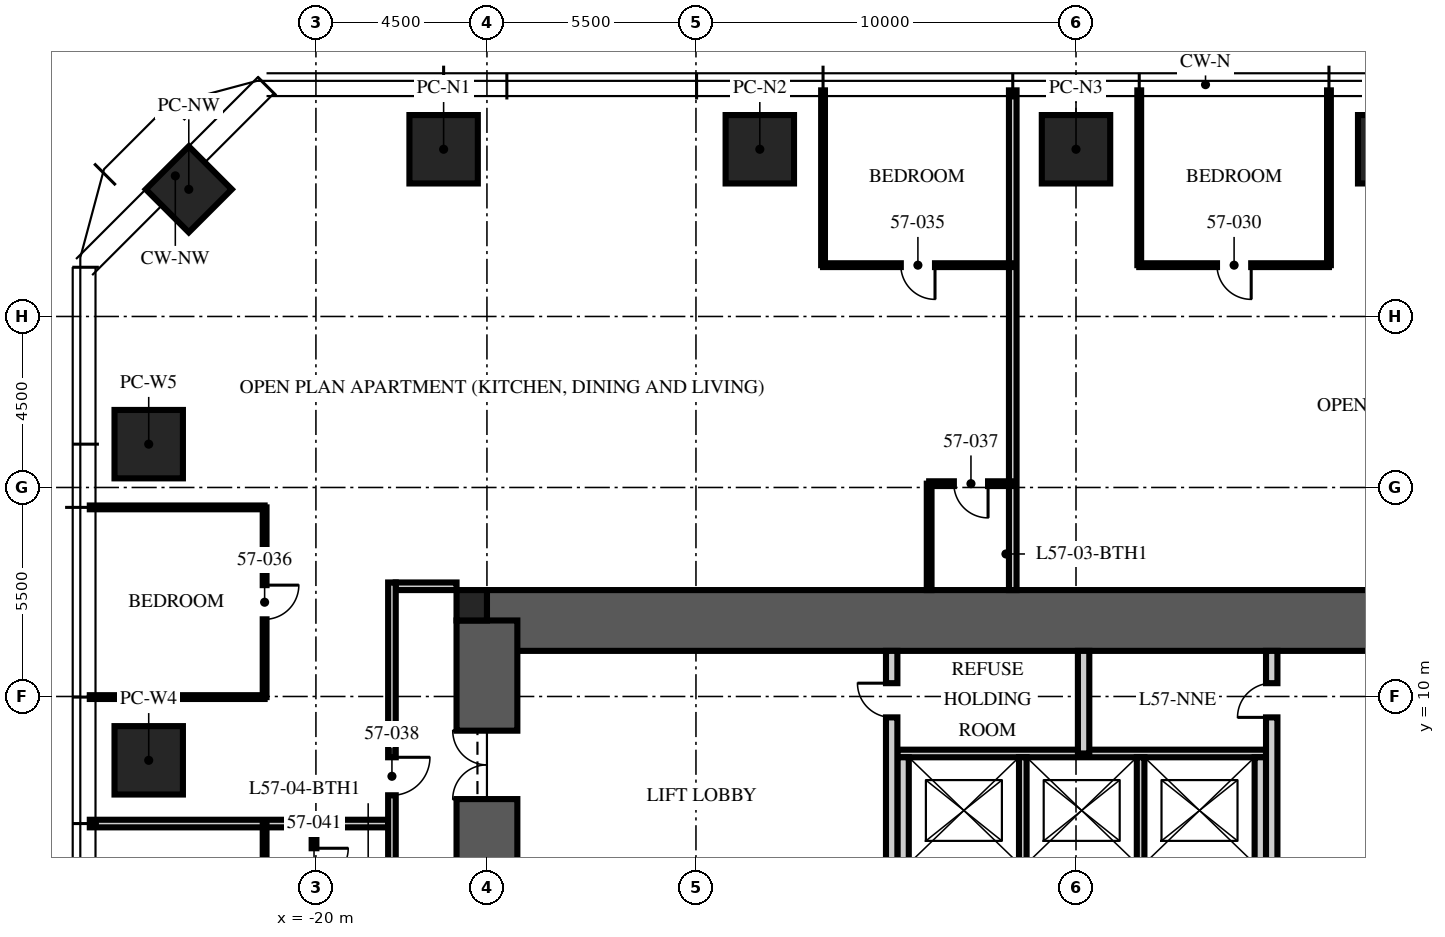
"""IFC4 building model, lengths in metres.
Left out: names, types, materials, properties, quantities, classifications, styles, units other than length and angle.
Written with IfcOpenShell. Run it as: python <this file> out.ifc"""

import sys

from ifc_helpers import new_model, si_unit, direction, frame, frame_2d, origin, origin_2d, place, context, subcontext, project, spatial, rectangle, extrude, element, fill, save


model = new_model("IFC4")
c1 = context("Model", 3, precision=1e-05, world=origin(), true_north=direction((0.0, 1.0)))
c2 = subcontext(c1, "Body", "Model", "MODEL_VIEW")
j1 = project(units=[si_unit("LENGTHUNIT", "METRE"), si_unit("PLANEANGLEUNIT", "RADIAN")], contexts=[c1])
p1 = place(None, origin())
s1 = spatial("IfcSite", under=j1, at=p1, CompositionType="ELEMENT")
p2 = place(p1, origin())
s2 = spatial("IfcBuilding", under=s1, at=p2, CompositionType="ELEMENT")
p3 = place(p2, frame((0.0, 0.0, 229.5)))
s3 = spatial("IfcBuildingStorey", under=s2, at=p3, CompositionType="ELEMENT", Elevation=229.5)
p4 = place(p3, frame((-15.5, 12.0, -0.25), z_axis=(0.0, 0.0, 1.0), x_axis=(1.0, 0.0, 0.0)))
e1 = element("IfcWall", 1, at=p4, inside=s3, PredefinedType="SHEAR", context=c2, shape_type="SweptSolid", body=[
    extrude(rectangle(XDim=31.0, YDim=1.6, at=frame_2d((15.5, 0.0))), origin(), (0.0, 0.0, 1.0), 3.75),
])
p5 = place(p3, frame((-15.5, -12.0, -0.25), z_axis=(0.0, 0.0, 1.0), x_axis=(0.0, 1.0, 0.0)))
e2 = element("IfcWall", 2, at=p5, inside=s3, PredefinedType="SHEAR", context=c2, shape_type="SweptSolid", body=[
    extrude(rectangle(XDim=24.0, YDim=1.6, at=frame_2d((12.0, 0.0))), origin(), (0.0, 0.0, 1.0), 3.75),
])
p6 = place(p5, frame((3.2, 0.0, 0.25)))
e3 = element("IfcOpeningElement", 3, at=p6, cuts=e2, PredefinedType="OPENING", context=c2, shape_type="SweptSolid", body=[
    extrude(rectangle(XDim=1.2, YDim=2.1, at=frame_2d((0.6, 1.05))), frame((0.0, 0.81, 0.0), z_axis=(0.0, -1.0, 0.0), x_axis=(1.0, 0.0, 0.0)), (0.0, 0.0, 1.0), 1.62),
])
p7 = place(p5, frame((19.3, 0.0, 0.25)))
e4 = element("IfcOpeningElement", 4, at=p7, cuts=e2, PredefinedType="OPENING", context=c2, shape_type="SweptSolid", body=[
    extrude(rectangle(XDim=1.8, YDim=2.1, at=frame_2d((0.9, 1.05))), frame((0.0, 0.81, 0.0), z_axis=(0.0, -1.0, 0.0), x_axis=(1.0, 0.0, 0.0)), (0.0, 0.0, 1.0), 1.62),
])
p8 = place(p3, frame((-15.9, 12.4, -0.25), z_axis=(0.0, 0.0, 1.0), x_axis=(1.0, 0.0, 0.0)))
e5 = element("IfcColumn", 5, at=p8, inside=s3, PredefinedType="COLUMN", context=c2, shape_type="SweptSolid", body=[
    extrude(rectangle(XDim=0.8, YDim=0.8, at=origin_2d()), origin(), (0.0, 0.0, 1.0), 3.75),
])
for number, where, z_axis, x_axis in (
    (6, (-16.64, 24.4, 0.0), (0.0, 0.0, 1.0), (1.0, 0.0, 0.0)),
    (7, (-8.32, 24.4, 0.0), (0.0, 0.0, 1.0), (1.0, 0.0, 0.0)),
    (8, (0.0, 24.4, 0.0), (0.0, 0.0, 1.0), (1.0, 0.0, 0.0)),
    (9, (8.32, 24.4, 0.0), (0.0, 0.0, 1.0), (1.0, 0.0, 0.0)),
    (10, (-24.4, 8.32, 0.0), (0.0, 0.0, 1.0), (0.0, 1.0, 0.0)),
    (11, (-24.4, 16.64, 0.0), (0.0, 0.0, 1.0), (0.0, 1.0, 0.0)),
):
    element("IfcColumn", number, at=place(p3, frame(where, z_axis=z_axis, x_axis=x_axis)), inside=s3, PredefinedType="COLUMN", context=c2, shape_type="SweptSolid", body=[
        extrude(rectangle(XDim=1.8, YDim=1.8, at=origin_2d()), origin(), (0.0, 0.0, 1.0), 3.75),
    ])
p9 = place(p3, frame((-23.346, 23.346, 0.0), z_axis=(0.0, 0.0, 1.0), x_axis=(0.707106781187, 0.707106781187, 0.0)))
e12 = element("IfcColumn", 12, at=p9, inside=s3, PredefinedType="COLUMN", context=c2, shape_type="SweptSolid", body=[
    extrude(rectangle(XDim=1.6, YDim=1.6, at=origin_2d()), origin(), (0.0, 0.0, 1.0), 3.75),
])
p10 = place(p3, frame((-4.7, 8.5, 0.0), z_axis=(0.0, 0.0, 1.0), x_axis=(1.0, 0.0, 0.0)))
e13 = element("IfcWall", 13, at=p10, inside=s3, PredefinedType="PARTITIONING", context=c2, shape_type="SweptSolid", body=[
    extrude(rectangle(XDim=9.7, YDim=0.2, at=frame_2d((4.85, 0.0))), origin(), (0.0, 0.0, 1.0), 3.5),
])
for number, where, z_axis, x_axis in (
    (14, (-4.55, 5.6, 0.0), (0.0, 0.0, 1.0), (0.0, 1.0, 0.0)),
    (15, (4.85, 5.6, 0.0), (0.0, 0.0, 1.0), (0.0, 1.0, 0.0)),
):
    element("IfcWall", number, at=place(p3, frame(where, z_axis=z_axis, x_axis=x_axis)), inside=s3, PredefinedType="PARTITIONING", context=c2, shape_type="SweptSolid", body=[
        extrude(rectangle(XDim=2.8, YDim=0.3, at=frame_2d((1.4, 0.0))), origin(), (0.0, 0.0, 1.0), 3.5),
    ])
for number, where, z_axis, x_axis in (
    (16, (-1.4, 5.6, 0.0), (0.0, 0.0, 1.0), (0.0, 1.0, 0.0)),
    (17, (1.7, 5.6, 0.0), (0.0, 0.0, 1.0), (0.0, 1.0, 0.0)),
):
    element("IfcWall", number, at=place(p3, frame(where, z_axis=z_axis, x_axis=x_axis)), inside=s3, PredefinedType="PARTITIONING", context=c2, shape_type="SweptSolid", body=[
        extrude(rectangle(XDim=2.8, YDim=0.2, at=frame_2d((1.4, 0.0))), origin(), (0.0, 0.0, 1.0), 3.5),
    ])
p11 = place(p3, frame((-4.85, 5.3, 0.0), z_axis=(0.0, 0.0, 1.0), x_axis=(0.0, 1.0, 0.0)))
e18 = element("IfcWall", 18, at=p11, inside=s3, PredefinedType="PARTITIONING", context=c2, shape_type="SweptSolid", body=[
    extrude(rectangle(XDim=5.9, YDim=0.3, at=frame_2d((2.95, 0.0))), origin(), (0.0, 0.0, 1.0), 3.5),
])
p12 = place(p11, frame((4.15, 0.0, 0.0)))
e19 = element("IfcOpeningElement", 19, at=p12, cuts=e18, PredefinedType="OPENING", context=c2, shape_type="SweptSolid", body=[
    extrude(rectangle(XDim=0.9, YDim=2.1, at=frame_2d((0.45, 1.05))), frame((0.0, 0.16, 0.0), z_axis=(0.0, -1.0, 0.0), x_axis=(1.0, 0.0, 0.0)), (0.0, 0.0, 1.0), 0.32),
])
p13 = place(p3, frame((5.15, 5.3, 0.0), z_axis=(0.0, 0.0, 1.0), x_axis=(0.0, 1.0, 0.0)))
e20 = element("IfcWall", 20, at=p13, inside=s3, PredefinedType="PARTITIONING", context=c2, shape_type="SweptSolid", body=[
    extrude(rectangle(XDim=5.9, YDim=0.3, at=frame_2d((2.95, 0.0))), origin(), (0.0, 0.0, 1.0), 3.5),
])
p14 = place(p13, frame((4.15, 0.0, 0.0)))
e21 = element("IfcOpeningElement", 21, at=p14, cuts=e20, PredefinedType="OPENING", context=c2, shape_type="SweptSolid", body=[
    extrude(rectangle(XDim=0.9, YDim=2.1, at=frame_2d((0.45, 1.05))), frame((0.0, 0.16, 0.0), z_axis=(0.0, -1.0, 0.0), x_axis=(1.0, 0.0, 0.0)), (0.0, 0.0, 1.0), 0.32),
])
p15 = place(p3, frame((0.2, 8.5, 0.0), z_axis=(0.0, 0.0, 1.0), x_axis=(0.0, 1.0, 0.0)))
e22 = element("IfcWall", 22, at=p15, inside=s3, PredefinedType="PARTITIONING", context=c2, shape_type="SweptSolid", body=[
    extrude(rectangle(XDim=2.7, YDim=0.3, at=frame_2d((1.35, 0.0))), origin(), (0.0, 0.0, 1.0), 3.5),
])
p16 = place(p3, frame((-16.3, 12.9, 0.0), z_axis=(0.0, 0.0, 1.0), x_axis=(-1.0, 0.0, 0.0)))
e23 = element("IfcWall", 23, at=p16, inside=s3, PredefinedType="PARTITIONING", context=c2, shape_type="SweptSolid", body=[
    extrude(rectangle(XDim=1.6, YDim=0.2, at=frame_2d((0.8, 0.0))), origin(), (0.0, 0.0, 1.0), 2.3),
])
for number, where, z_axis, x_axis in (
    (24, (6.656, 21.35, 0.0), (0.0, 0.0, 1.0), (0.0, 1.0, 0.0)),
    (25, (1.664, 21.35, 0.0), (0.0, 0.0, 1.0), (0.0, 1.0, 0.0)),
):
    element("IfcWall", number, at=place(p3, frame(where, z_axis=z_axis, x_axis=x_axis)), inside=s3, PredefinedType="PARTITIONING", context=c2, shape_type="SweptSolid", body=[
        extrude(rectangle(XDim=4.6, YDim=0.1, at=frame_2d((2.3, 0.0))), origin(), (0.0, 0.0, 1.0), 2.91),
    ])
p17 = place(p3, frame((-1.664, 12.8, 0.0), z_axis=(0.0, 0.0, 1.0), x_axis=(0.0, 1.0, 0.0)))
e26 = element("IfcWall", 26, at=p17, inside=s3, PredefinedType="PARTITIONING", context=c2, shape_type="SweptSolid", body=[
    extrude(rectangle(XDim=13.15, YDim=0.2, at=frame_2d((6.575, 0.0))), origin(), (0.0, 0.0, 1.0), 2.91),
])
for number, where, z_axis, x_axis in (
    (27, (-6.656, 21.35, 0.0), (0.0, 0.0, 1.0), (0.0, 1.0, 0.0)),
    (28, (-21.35, 14.976, 0.0), (0.0, 0.0, 1.0), (-1.0, 0.0, 0.0)),
    (29, (-21.35, 9.984, 0.0), (0.0, 0.0, 1.0), (-1.0, 0.0, 0.0)),
):
    element("IfcWall", number, at=place(p3, frame(where, z_axis=z_axis, x_axis=x_axis)), inside=s3, PredefinedType="PARTITIONING", context=c2, shape_type="SweptSolid", body=[
        extrude(rectangle(XDim=4.6, YDim=0.1, at=frame_2d((2.3, 0.0))), origin(), (0.0, 0.0, 1.0), 2.91),
    ])
p18 = place(p3, frame((-18.1, 6.656, 0.0), z_axis=(0.0, 0.0, 1.0), x_axis=(-1.0, 0.0, 0.0)))
e30 = element("IfcWall", 30, at=p18, inside=s3, PredefinedType="PARTITIONING", context=c2, shape_type="SweptSolid", body=[
    extrude(rectangle(XDim=7.85, YDim=0.2, at=frame_2d((3.925, 0.0))), origin(), (0.0, 0.0, 1.0), 2.91),
])
p19 = place(p3, frame((6.656, 21.35, 0.0), z_axis=(0.0, 0.0, 1.0), x_axis=(-1.0, 0.0, 0.0)))
e31 = element("IfcWall", 31, at=p19, inside=s3, PredefinedType="PARTITIONING", context=c2, shape_type="SweptSolid", body=[
    extrude(rectangle(XDim=4.992, YDim=0.1, at=frame_2d((2.496, 0.0))), origin(), (0.0, 0.0, 1.0), 2.81),
])
p20 = place(p19, frame((2.046, 0.0, 0.0)))
e32 = element("IfcOpeningElement", 32, at=p20, cuts=e31, PredefinedType="OPENING", context=c2, shape_type="SweptSolid", body=[
    extrude(rectangle(XDim=0.9, YDim=2.1, at=frame_2d((0.45, 1.05))), frame((0.0, 0.06, 0.0), z_axis=(0.0, -1.0, 0.0), x_axis=(1.0, 0.0, 0.0)), (0.0, 0.0, 1.0), 0.12),
])
p21 = place(p3, frame((-1.664, 21.35, 0.0), z_axis=(0.0, 0.0, 1.0), x_axis=(-1.0, 0.0, 0.0)))
e33 = element("IfcWall", 33, at=p21, inside=s3, PredefinedType="PARTITIONING", context=c2, shape_type="SweptSolid", body=[
    extrude(rectangle(XDim=4.992, YDim=0.1, at=frame_2d((2.496, 0.0))), origin(), (0.0, 0.0, 1.0), 2.81),
])
p22 = place(p21, frame((2.046, 0.0, 0.0)))
e34 = element("IfcOpeningElement", 34, at=p22, cuts=e33, PredefinedType="OPENING", context=c2, shape_type="SweptSolid", body=[
    extrude(rectangle(XDim=0.9, YDim=2.1, at=frame_2d((0.45, 1.05))), frame((0.0, 0.06, 0.0), z_axis=(0.0, -1.0, 0.0), x_axis=(1.0, 0.0, 0.0)), (0.0, 0.0, 1.0), 0.12),
])
p23 = place(p3, frame((-21.35, 14.976, 0.0), z_axis=(0.0, 0.0, 1.0), x_axis=(0.0, -1.0, 0.0)))
e35 = element("IfcWall", 35, at=p23, inside=s3, PredefinedType="PARTITIONING", context=c2, shape_type="SweptSolid", body=[
    extrude(rectangle(XDim=4.992, YDim=0.1, at=frame_2d((2.496, 0.0))), origin(), (0.0, 0.0, 1.0), 2.81),
])
p24 = place(p23, frame((2.046, 0.0, 0.0)))
e36 = element("IfcOpeningElement", 36, at=p24, cuts=e35, PredefinedType="OPENING", context=c2, shape_type="SweptSolid", body=[
    extrude(rectangle(XDim=0.9, YDim=2.1, at=frame_2d((0.45, 1.05))), frame((0.0, 0.06, 0.0), z_axis=(0.0, -1.0, 0.0), x_axis=(1.0, 0.0, 0.0)), (0.0, 0.0, 1.0), 0.12),
])
p25 = place(p3, frame((-1.664, 15.6, 0.0), z_axis=(0.0, 0.0, 1.0), x_axis=(-1.0, 0.0, 0.0)))
e37 = element("IfcWall", 37, at=p25, inside=s3, PredefinedType="PARTITIONING", context=c2, shape_type="SweptSolid", body=[
    extrude(rectangle(XDim=2.2, YDim=0.125, at=frame_2d((1.1, 0.0))), origin(), (0.0, 0.0, 1.0), 3.5),
])
p26 = place(p25, frame((0.65, 0.0, 0.0)))
e38 = element("IfcOpeningElement", 38, at=p26, cuts=e37, PredefinedType="OPENING", context=c2, shape_type="SweptSolid", body=[
    extrude(rectangle(XDim=0.9, YDim=2.1, at=frame_2d((0.45, 1.05))), frame((0.0, 0.073, 0.0), z_axis=(0.0, -1.0, 0.0), x_axis=(1.0, 0.0, 0.0)), (0.0, 0.0, 1.0), 0.145),
])
p27 = place(p3, frame((-3.864, 12.8, 0.0), z_axis=(0.0, 0.0, 1.0), x_axis=(0.0, 1.0, 0.0)))
e39 = element("IfcWall", 39, at=p27, inside=s3, PredefinedType="PARTITIONING", context=c2, shape_type="SweptSolid", body=[
    extrude(rectangle(XDim=2.8, YDim=0.125, at=frame_2d((1.4, 0.0))), origin(), (0.0, 0.0, 1.0), 3.5),
])
p28 = place(p3, frame((-21.35, 6.656, 0.0), z_axis=(0.0, 0.0, 1.0), x_axis=(0.0, -1.0, 0.0)))
e40 = element("IfcWall", 40, at=p28, inside=s3, PredefinedType="PARTITIONING", context=c2, shape_type="SweptSolid", body=[
    extrude(rectangle(XDim=4.992, YDim=0.1, at=frame_2d((2.496, 0.0))), origin(), (0.0, 0.0, 1.0), 2.81),
])
p29 = place(p28, frame((2.046, 0.0, 0.0)))
e41 = element("IfcOpeningElement", 41, at=p29, cuts=e40, PredefinedType="OPENING", context=c2, shape_type="SweptSolid", body=[
    extrude(rectangle(XDim=0.9, YDim=2.1, at=frame_2d((0.45, 1.05))), frame((0.0, 0.06, 0.0), z_axis=(0.0, -1.0, 0.0), x_axis=(1.0, 0.0, 0.0)), (0.0, 0.0, 1.0), 0.12),
])
p30 = place(p3, frame((-20.05, 6.656, 0.0), z_axis=(0.0, 0.0, 1.0), x_axis=(0.0, -1.0, 0.0)))
e42 = element("IfcWall", 42, at=p30, inside=s3, PredefinedType="PARTITIONING", context=c2, shape_type="SweptSolid", body=[
    extrude(rectangle(XDim=2.2, YDim=0.125, at=frame_2d((1.1, 0.0))), origin(), (0.0, 0.0, 1.0), 3.5),
])
p31 = place(p30, frame((0.65, 0.0, 0.0)))
e43 = element("IfcOpeningElement", 43, at=p31, cuts=e42, PredefinedType="OPENING", context=c2, shape_type="SweptSolid", body=[
    extrude(rectangle(XDim=0.9, YDim=2.1, at=frame_2d((0.45, 1.05))), frame((0.0, 0.073, 0.0), z_axis=(0.0, -1.0, 0.0), x_axis=(1.0, 0.0, 0.0)), (0.0, 0.0, 1.0), 0.145),
])
p32 = place(p3, frame((-18.0, 13.0, 0.0), z_axis=(0.0, 0.0, 1.0), x_axis=(0.0, -1.0, 0.0)))
e44 = element("IfcWall", 44, at=p32, inside=s3, PredefinedType="PARTITIONING", context=c2, shape_type="SweptSolid", body=[
    extrude(rectangle(XDim=25.8, YDim=0.2, at=frame_2d((12.9, 0.0))), origin(), (0.0, 0.0, 1.0), 2.6),
])
p33 = place(p32, frame((4.6, 0.0, 0.0)))
e45 = element("IfcOpeningElement", 45, at=p33, cuts=e44, PredefinedType="OPENING", context=c2, shape_type="SweptSolid", body=[
    extrude(rectangle(XDim=1.0, YDim=2.2, at=frame_2d((0.5, 1.1))), frame((0.0, 0.11, 0.0), z_axis=(0.0, -1.0, 0.0), x_axis=(1.0, 0.0, 0.0)), (0.0, 0.0, 1.0), 0.22),
])
p34 = place(p32, frame((21.364, 0.0, 0.0)))
e46 = element("IfcOpeningElement", 46, at=p34, cuts=e44, PredefinedType="OPENING", context=c2, shape_type="SweptSolid", body=[
    extrude(rectangle(XDim=1.0, YDim=2.2, at=frame_2d((0.5, 1.1))), frame((0.0, 0.11, 0.0), z_axis=(0.0, -1.0, 0.0), x_axis=(1.0, 0.0, 0.0)), (0.0, 0.0, 1.0), 0.22),
])
p35 = place(p32, frame((23.754, 0.0, 0.0)))
e47 = element("IfcOpeningElement", 47, at=p35, cuts=e44, PredefinedType="OPENING", context=c2, shape_type="SweptSolid", body=[
    extrude(rectangle(XDim=1.0, YDim=2.2, at=frame_2d((0.5, 1.1))), frame((0.0, 0.11, 0.0), z_axis=(0.0, -1.0, 0.0), x_axis=(1.0, 0.0, 0.0)), (0.0, 0.0, 1.0), 0.22),
])
p36 = place(p7, origin())
e48 = element("IfcDoor", 48, at=p36, inside=s3, OperationType="DOUBLE_DOOR_SINGLE_SWING", PredefinedType="DOOR", context=c2, shape_type="SweptSolid", body=[
    extrude(rectangle(XDim=1.8, YDim=2.1, at=frame_2d((0.9, 1.05))), frame((0.0, 0.025, 0.0), z_axis=(0.0, -1.0, 0.0), x_axis=(1.0, 0.0, 0.0)), (0.0, 0.0, 1.0), 0.05),
])
fill(e4, e48)
p37 = place(p12, origin())
e49 = element("IfcDoor", 49, at=p37, inside=s3, OperationType="SINGLE_SWING_RIGHT", PredefinedType="DOOR", context=c2, shape_type="SweptSolid", body=[
    extrude(rectangle(XDim=0.9, YDim=2.1, at=frame_2d((0.45, 1.05))), frame((0.0, 0.025, 0.0), z_axis=(0.0, -1.0, 0.0), x_axis=(1.0, 0.0, 0.0)), (0.0, 0.0, 1.0), 0.05),
])
fill(e19, e49)
p38 = place(p14, origin())
e50 = element("IfcDoor", 50, at=p38, inside=s3, OperationType="SINGLE_SWING_LEFT", PredefinedType="DOOR", context=c2, shape_type="SweptSolid", body=[
    extrude(rectangle(XDim=0.9, YDim=2.1, at=frame_2d((0.45, 1.05))), frame((0.0, 0.025, 0.0), z_axis=(0.0, -1.0, 0.0), x_axis=(1.0, 0.0, 0.0)), (0.0, 0.0, 1.0), 0.05),
])
fill(e21, e50)
p39 = place(p20, origin())
e51 = element("IfcDoor", 51, at=p39, inside=s3, OperationType="SINGLE_SWING_LEFT", PredefinedType="DOOR", context=c2, shape_type="SweptSolid", body=[
    extrude(rectangle(XDim=0.9, YDim=2.1, at=frame_2d((0.45, 1.05))), frame((0.0, 0.025, 0.0), z_axis=(0.0, -1.0, 0.0), x_axis=(1.0, 0.0, 0.0)), (0.0, 0.0, 1.0), 0.05),
])
fill(e32, e51)
p40 = place(p22, origin())
e52 = element("IfcDoor", 52, at=p40, inside=s3, OperationType="SINGLE_SWING_LEFT", PredefinedType="DOOR", context=c2, shape_type="SweptSolid", body=[
    extrude(rectangle(XDim=0.9, YDim=2.1, at=frame_2d((0.45, 1.05))), frame((0.0, 0.025, 0.0), z_axis=(0.0, -1.0, 0.0), x_axis=(1.0, 0.0, 0.0)), (0.0, 0.0, 1.0), 0.05),
])
fill(e34, e52)
p41 = place(p24, origin())
e53 = element("IfcDoor", 53, at=p41, inside=s3, OperationType="SINGLE_SWING_LEFT", PredefinedType="DOOR", context=c2, shape_type="SweptSolid", body=[
    extrude(rectangle(XDim=0.9, YDim=2.1, at=frame_2d((0.45, 1.05))), frame((0.0, 0.025, 0.0), z_axis=(0.0, -1.0, 0.0), x_axis=(1.0, 0.0, 0.0)), (0.0, 0.0, 1.0), 0.05),
])
fill(e36, e53)
p42 = place(p26, origin())
e54 = element("IfcDoor", 54, at=p42, inside=s3, OperationType="SINGLE_SWING_LEFT", PredefinedType="DOOR", context=c2, shape_type="SweptSolid", body=[
    extrude(rectangle(XDim=0.9, YDim=2.1, at=frame_2d((0.45, 1.05))), frame((0.0, 0.025, 0.0), z_axis=(0.0, -1.0, 0.0), x_axis=(1.0, 0.0, 0.0)), (0.0, 0.0, 1.0), 0.05),
])
fill(e38, e54)
p43 = place(p33, origin())
e55 = element("IfcDoor", 55, at=p43, inside=s3, OperationType="SINGLE_SWING_LEFT", PredefinedType="DOOR", context=c2, shape_type="SweptSolid", body=[
    extrude(rectangle(XDim=1.0, YDim=2.2, at=frame_2d((0.5, 1.1))), frame((0.0, 0.025, 0.0), z_axis=(0.0, -1.0, 0.0), x_axis=(1.0, 0.0, 0.0)), (0.0, 0.0, 1.0), 0.05),
])
fill(e45, e55)
p44 = place(p31, origin())
e56 = element("IfcDoor", 56, at=p44, inside=s3, OperationType="SINGLE_SWING_LEFT", PredefinedType="DOOR", context=c2, shape_type="SweptSolid", body=[
    extrude(rectangle(XDim=0.9, YDim=2.1, at=frame_2d((0.45, 1.05))), frame((0.0, 0.025, 0.0), z_axis=(0.0, -1.0, 0.0), x_axis=(1.0, 0.0, 0.0)), (0.0, 0.0, 1.0), 0.05),
])
fill(e43, e56)
save(model, sys.argv[1])
